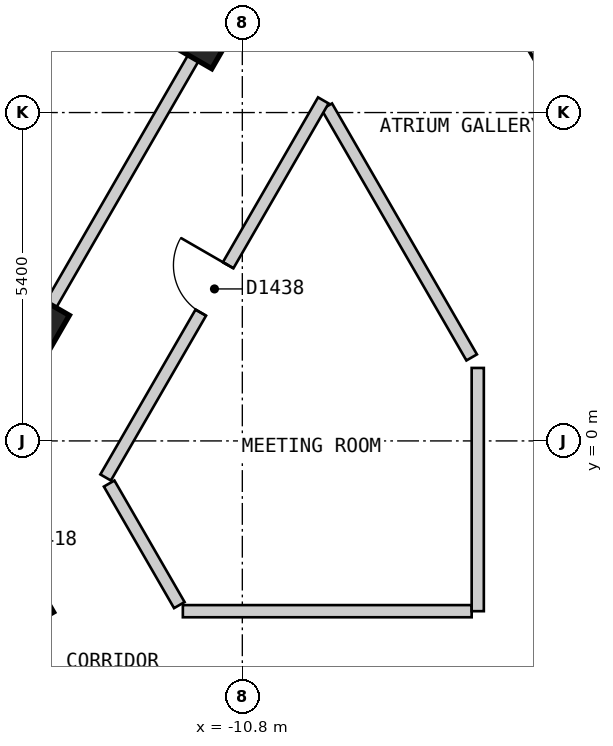
"""IFC4 building model, lengths in metres.
Left out: names, types, materials, properties, quantities, classifications, styles, units other than length and angle.
Written with IfcOpenShell. Run it as: python <this file> out.ifc"""

import sys

from ifc_helpers import new_model, si_unit, direction, frame, frame_2d, origin, origin_2d, place, context, subcontext, project, spatial, rectangle, extrude, element, fill, save


model = new_model("IFC4")
c1 = context("Model", 3, precision=1e-05, world=origin(), true_north=direction((0.0, 1.0)))
c2 = subcontext(c1, "Body", "Model", "MODEL_VIEW")
j1 = project(units=[si_unit("LENGTHUNIT", "METRE"), si_unit("PLANEANGLEUNIT", "RADIAN")], contexts=[c1])
p1 = place(None, origin())
s1 = spatial("IfcSite", under=j1, at=p1, CompositionType="ELEMENT")
p2 = place(p1, origin())
s2 = spatial("IfcBuilding", under=s1, at=p2, CompositionType="ELEMENT")
p3 = place(p2, frame((0.0, 0.0, 178.2)))
s3 = spatial("IfcBuildingStorey", under=s2, at=p3, CompositionType="ELEMENT", Elevation=178.2)
for number, where, z_axis, x_axis in (
    (1, (-14.383, -2.687, 0.0), (0.0, 0.0, 1.0), (0.5, -0.866, 0.0)),
    (2, (-11.431, 6.6, 0.0), (0.0, 0.0, 1.0), (-0.5, -0.866, 0.0)),
    (3, (-14.123, 1.937, 0.0), (0.0, 0.0, 1.0), (-0.5, -0.866, 0.0)),
):
    element("IfcColumn", number, at=place(p3, frame(where, z_axis=z_axis, x_axis=x_axis)), inside=s3, PredefinedType="COLUMN", context=c2, shape_type="SweptSolid", body=[
        extrude(rectangle(XDim=0.7, YDim=0.7, at=origin_2d()), origin(), (0.0, 0.0, 1.0), 3.0),
    ])
p4 = place(p3, frame((-9.411, 5.5, 0.0), z_axis=(0.0, 0.0, 1.0), x_axis=(0.500018099276, -0.86601495391, 0.0)))
e4 = element("IfcWall", 4, at=p4, inside=s3, PredefinedType="PARTITIONING", context=c2, shape_type="SweptSolid", body=[
    extrude(rectangle(XDim=4.765, YDim=0.2, at=frame_2d((2.383, 0.0))), origin(), (0.0, 0.0, 1.0), 2.7),
])
p5 = place(p3, frame((-12.99, -0.701, 0.0), z_axis=(0.0, 0.0, 1.0), x_axis=(0.499972710878, -0.866041158593, 0.0)))
e5 = element("IfcWall", 5, at=p5, inside=s3, PredefinedType="PARTITIONING", context=c2, shape_type="SweptSolid", body=[
    extrude(rectangle(XDim=2.308, YDim=0.2, at=frame_2d((1.154, 0.0))), origin(), (0.0, 0.0, 1.0), 2.7),
])
p6 = place(p3, frame((-11.778, -2.8, 0.0), z_axis=(0.0, 0.0, 1.0), x_axis=(1.0, 0.0, 0.0)))
e6 = element("IfcWall", 6, at=p6, inside=s3, PredefinedType="PARTITIONING", context=c2, shape_type="SweptSolid", body=[
    extrude(rectangle(XDim=4.75, YDim=0.2, at=frame_2d((2.375, 0.0))), origin(), (0.0, 0.0, 1.0), 2.7),
])
p7 = place(p3, frame((-13.048, -0.601, 0.0), z_axis=(0.0, 0.0, 1.0), x_axis=(0.499982180423, 0.866035691677, 0.0)))
e7 = element("IfcWall", 7, at=p7, inside=s3, PredefinedType="PARTITIONING", context=c2, shape_type="SweptSolid", body=[
    extrude(rectangle(XDim=7.16, YDim=0.2, at=frame_2d((3.58, 0.0))), origin(), (0.0, 0.0, 1.0), 2.7),
])
p8 = place(p7, frame((3.13, 0.0, 0.0)))
e8 = element("IfcOpeningElement", 8, at=p8, cuts=e7, PredefinedType="OPENING", context=c2, shape_type="SweptSolid", body=[
    extrude(rectangle(XDim=0.9, YDim=2.1, at=frame_2d((0.45, 1.05))), frame((0.0, 0.11, 0.0), z_axis=(0.0, -1.0, 0.0), x_axis=(1.0, 0.0, 0.0)), (0.0, 0.0, 1.0), 0.22),
])
p9 = place(p3, frame((-15.53, -0.501, 0.0), z_axis=(0.0, 0.0, 1.0), x_axis=(0.499952498232, 0.866052827206, 0.0)))
e9 = element("IfcWall", 9, at=p9, inside=s3, PredefinedType="PARTITIONING", context=c2, shape_type="SweptSolid", body=[
    extrude(rectangle(XDim=9.585, YDim=0.2, at=frame_2d((4.792, 0.0))), origin(), (0.0, 0.0, 1.0), 2.7),
])
p10 = place(p3, frame((-6.928, -2.8, 0.0), z_axis=(0.0, 0.0, 1.0), x_axis=(0.0, 1.0, 0.0)))
e10 = element("IfcWall", 10, at=p10, inside=s3, PredefinedType="PARTITIONING", context=c2, shape_type="SweptSolid", body=[
    extrude(rectangle(XDim=4.0, YDim=0.2, at=frame_2d((2.0, 0.0))), origin(), (0.0, 0.0, 1.0), 2.7),
])
p11 = place(p8, origin())
e11 = element("IfcDoor", 11, at=p11, inside=s3, OperationType="SINGLE_SWING_RIGHT", PredefinedType="DOOR", context=c2, shape_type="SweptSolid", body=[
    extrude(rectangle(XDim=0.9, YDim=2.1, at=frame_2d((0.45, 1.05))), frame((0.0, 0.025, 0.0), z_axis=(0.0, -1.0, 0.0), x_axis=(1.0, 0.0, 0.0)), (0.0, 0.0, 1.0), 0.05),
])
fill(e8, e11)
save(model, sys.argv[1])
